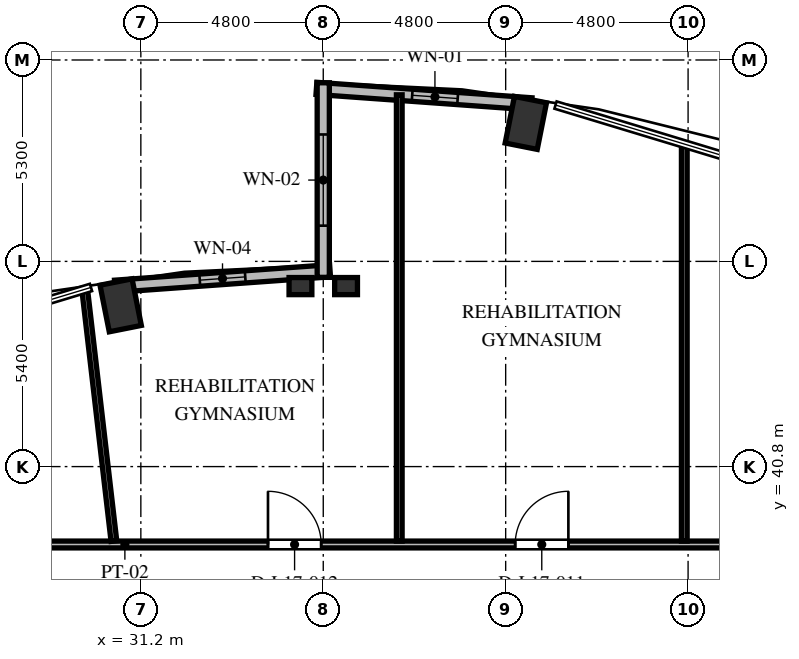
"""IFC4 building model, lengths in metres.
Left out: names, types, materials, properties, quantities, classifications, styles, units other than length and angle.
Written with IfcOpenShell. Run it as: python <this file> out.ifc"""

import sys

from ifc_helpers import new_model, si_unit, direction, frame, frame_2d, origin, origin_2d, place, context, subcontext, project, spatial, rectangle, extrude, element, fill, save


model = new_model("IFC4")
c1 = context("Model", 3, precision=1e-05, world=origin(), true_north=direction((0.0, 1.0)))
c2 = subcontext(c1, "Body", "Model", "MODEL_VIEW")
j1 = project(units=[si_unit("LENGTHUNIT", "METRE"), si_unit("PLANEANGLEUNIT", "RADIAN")], contexts=[c1])
p1 = place(None, origin())
s1 = spatial("IfcSite", under=j1, at=p1, CompositionType="ELEMENT")
p2 = place(p1, origin())
s2 = spatial("IfcBuilding", under=s1, at=p2, CompositionType="ELEMENT")
p3 = place(p2, frame((0.0, 0.0, 68.976)))
s3 = spatial("IfcBuildingStorey", under=s2, at=p3, CompositionType="ELEMENT", Elevation=68.976)
for number, where, z_axis, x_axis in (
    (1, (41.331, 49.844, 0.0), (0.0, 0.0, 1.0), (0.195, 0.981, 0.0)),
    (2, (30.669, 45.044, 0.0), (0.0, 0.0, 1.0), (-0.195, 0.981, 0.0)),
):
    element("IfcColumn", number, at=place(p3, frame(where, z_axis=z_axis, x_axis=x_axis)), inside=s3, PredefinedType="COLUMN", context=c2, shape_type="SweptSolid", body=[
        extrude(rectangle(XDim=1.25, YDim=0.86, at=origin_2d()), origin(), (0.0, 0.0, 1.0), 3.648),
    ])
for number, where, z_axis, x_axis in (
    (3, (35.4, 45.55, 0.0), (0.0, 0.0, 1.0), (1.0, 0.0, 0.0)),
    (4, (36.6, 45.55, 0.0), (0.0, 0.0, 1.0), (1.0, 0.0, 0.0)),
):
    element("IfcColumn", number, at=place(p3, frame(where, z_axis=z_axis, x_axis=x_axis)), inside=s3, PredefinedType="PILASTER", context=c2, shape_type="SweptSolid", body=[
        extrude(rectangle(XDim=0.6, YDim=0.45, at=origin_2d()), origin(), (0.0, 0.0, 1.0), 3.648),
    ])
p4 = place(p3, frame((41.481, 50.346, 0.0), z_axis=(0.0, 0.0, 1.0), x_axis=(-0.997422321809, 0.071754525696, 0.0)))
e5 = element("IfcWall", 5, at=p4, inside=s3, PredefinedType="SOLIDWALL", context=c2, shape_type="SweptSolid", body=[
    extrude(rectangle(XDim=5.675, YDim=0.32, at=frame_2d((2.838, 0.0))), origin(), (0.0, 0.0, 1.0), 3.428),
])
p5 = place(p4, frame((1.949, 0.0, 0.85)))
e6 = element("IfcOpeningElement", 6, at=p5, cuts=e5, PredefinedType="OPENING", context=c2, shape_type="SweptSolid", body=[
    extrude(rectangle(XDim=1.2, YDim=2.2, at=frame_2d((0.6, 1.1))), frame((0.0, 0.17, 0.0), z_axis=(0.0, -1.0, 0.0), x_axis=(1.0, 0.0, 0.0)), (0.0, 0.0, 1.0), 0.34),
])
p6 = place(p3, frame((36.179, 45.953, 0.0), z_axis=(0.0, 0.0, 1.0), x_axis=(-0.997421878774, -0.071760683825, 0.0)))
e7 = element("IfcWall", 7, at=p6, inside=s3, PredefinedType="SOLIDWALL", context=c2, shape_type="SweptSolid", body=[
    extrude(rectangle(XDim=5.675, YDim=0.32, at=frame_2d((2.837, 0.0))), origin(), (0.0, 0.0, 1.0), 3.428),
])
p7 = place(p6, frame((2.237, 0.0, 0.85)))
e8 = element("IfcOpeningElement", 8, at=p7, cuts=e7, PredefinedType="OPENING", context=c2, shape_type="SweptSolid", body=[
    extrude(rectangle(XDim=1.2, YDim=1.8, at=frame_2d((0.6, 0.9))), frame((0.0, 0.17, 0.0), z_axis=(0.0, -1.0, 0.0), x_axis=(1.0, 0.0, 0.0)), (0.0, 0.0, 1.0), 0.34),
])
p8 = place(p3, frame((36.0, 50.9, 0.0), z_axis=(0.0, 0.0, 1.0), x_axis=(0.0, -1.0, 0.0)))
e9 = element("IfcWall", 9, at=p8, inside=s3, PredefinedType="SOLIDWALL", context=c2, shape_type="SweptSolid", body=[
    extrude(rectangle(XDim=5.12, YDim=0.32, at=frame_2d((2.56, 0.0))), origin(), (0.0, 0.0, 1.0), 3.428),
])
p9 = place(p8, frame((1.36, 0.0, 0.84)))
e10 = element("IfcOpeningElement", 10, at=p9, cuts=e9, PredefinedType="OPENING", context=c2, shape_type="SweptSolid", body=[
    extrude(rectangle(XDim=2.4, YDim=2.04, at=frame_2d((1.2, 1.02))), frame((0.0, 0.17, 0.0), z_axis=(0.0, -1.0, 0.0), x_axis=(1.0, 0.0, 0.0)), (0.0, 0.0, 1.0), 0.34),
])
p10 = place(p3, frame((23.31, 38.75, 0.0), z_axis=(0.0, 0.0, 1.0), x_axis=(1.0, 0.0, 0.0)))
e11 = element("IfcWall", 11, at=p10, inside=s3, PredefinedType="PARTITIONING", context=c2, shape_type="SweptSolid", body=[
    extrude(rectangle(XDim=29.88, YDim=0.18, at=frame_2d((14.94, 0.0))), origin(), (0.0, 0.0, 1.0), 3.053),
])
p11 = place(p10, frame((25.176, 0.0, 0.0)))
e12 = element("IfcOpeningElement", 12, at=p11, cuts=e11, PredefinedType="OPENING", context=c2, shape_type="SweptSolid", body=[
    extrude(rectangle(XDim=1.4, YDim=2.2, at=frame_2d((0.7, 1.1))), frame((0.0, 0.1, 0.0), z_axis=(0.0, -1.0, 0.0), x_axis=(1.0, 0.0, 0.0)), (0.0, 0.0, 1.0), 0.2),
])
p12 = place(p10, frame((17.74, 0.0, 0.0)))
e13 = element("IfcOpeningElement", 13, at=p12, cuts=e11, PredefinedType="OPENING", context=c2, shape_type="SweptSolid", body=[
    extrude(rectangle(XDim=1.4, YDim=2.2, at=frame_2d((0.7, 1.1))), frame((0.0, 0.1, 0.0), z_axis=(0.0, -1.0, 0.0), x_axis=(1.0, 0.0, 0.0)), (0.0, 0.0, 1.0), 0.2),
])
p13 = place(p10, frame((11.236, 0.0, 0.0)))
e14 = element("IfcOpeningElement", 14, at=p13, cuts=e11, PredefinedType="OPENING", context=c2, shape_type="SweptSolid", body=[
    extrude(rectangle(XDim=1.4, YDim=2.2, at=frame_2d((0.7, 1.1))), frame((0.0, 0.1, 0.0), z_axis=(0.0, -1.0, 0.0), x_axis=(1.0, 0.0, 0.0)), (0.0, 0.0, 1.0), 0.2),
])
p14 = place(p3, frame((30.491, 38.84, 0.0), z_axis=(0.0, 0.0, 1.0), x_axis=(-0.115342161953, 0.993325820502, 0.0)))
e15 = element("IfcWall", 15, at=p14, inside=s3, PredefinedType="PARTITIONING", context=c2, shape_type="SweptSolid", body=[
    extrude(rectangle(XDim=6.672, YDim=0.15, at=frame_2d((3.336, 0.0))), origin(), (0.0, 0.0, 1.0), 3.428),
])
p15 = place(p3, frame((38.0, 38.84, 0.0), z_axis=(0.0, 0.0, 1.0), x_axis=(0.0, 1.0, 0.0)))
e16 = element("IfcWall", 16, at=p15, inside=s3, PredefinedType="PARTITIONING", context=c2, shape_type="SweptSolid", body=[
    extrude(rectangle(XDim=11.743, YDim=0.15, at=frame_2d((5.872, 0.0))), origin(), (0.0, 0.0, 1.0), 3.428),
])
p16 = place(p3, frame((45.5, 38.84, 0.0), z_axis=(0.0, 0.0, 1.0), x_axis=(0.0, 1.0, 0.0)))
e17 = element("IfcWall", 17, at=p16, inside=s3, PredefinedType="PARTITIONING", context=c2, shape_type="SweptSolid", body=[
    extrude(rectangle(XDim=10.436, YDim=0.15, at=frame_2d((5.218, 0.0))), origin(), (0.0, 0.0, 1.0), 3.428),
])
p17 = place(p5, origin())
e18 = element("IfcWindow", 18, at=p17, inside=s3, PartitioningType="SINGLE_PANEL", PredefinedType="WINDOW", context=c2, shape_type="SweptSolid", body=[
    extrude(rectangle(XDim=1.2, YDim=2.2, at=frame_2d((0.6, 1.1))), frame((0.0, 0.03, 0.0), z_axis=(0.0, -1.0, 0.0), x_axis=(1.0, 0.0, 0.0)), (0.0, 0.0, 1.0), 0.06),
])
fill(e6, e18)
p18 = place(p7, origin())
e19 = element("IfcWindow", 19, at=p18, inside=s3, PartitioningType="SINGLE_PANEL", PredefinedType="WINDOW", context=c2, shape_type="SweptSolid", body=[
    extrude(rectangle(XDim=1.2, YDim=1.8, at=frame_2d((0.6, 0.9))), frame((0.0, 0.03, 0.0), z_axis=(0.0, -1.0, 0.0), x_axis=(1.0, 0.0, 0.0)), (0.0, 0.0, 1.0), 0.06),
])
fill(e8, e19)
p19 = place(p9, origin())
e20 = element("IfcWindow", 20, at=p19, inside=s3, PartitioningType="SINGLE_PANEL", PredefinedType="WINDOW", context=c2, shape_type="SweptSolid", body=[
    extrude(rectangle(XDim=2.4, YDim=2.04, at=frame_2d((1.2, 1.02))), frame((0.0, 0.03, 0.0), z_axis=(0.0, -1.0, 0.0), x_axis=(1.0, 0.0, 0.0)), (0.0, 0.0, 1.0), 0.06),
])
fill(e10, e20)
p20 = place(p12, origin())
e21 = element("IfcDoor", 21, at=p20, inside=s3, OperationType="SINGLE_SWING_RIGHT", PredefinedType="DOOR", context=c2, shape_type="SweptSolid", body=[
    extrude(rectangle(XDim=1.4, YDim=2.2, at=frame_2d((0.7, 1.1))), frame((0.0, 0.025, 0.0), z_axis=(0.0, -1.0, 0.0), x_axis=(1.0, 0.0, 0.0)), (0.0, 0.0, 1.0), 0.05),
])
fill(e13, e21)
p21 = place(p13, origin())
e22 = element("IfcDoor", 22, at=p21, inside=s3, OperationType="SINGLE_SWING_LEFT", PredefinedType="DOOR", context=c2, shape_type="SweptSolid", body=[
    extrude(rectangle(XDim=1.4, YDim=2.2, at=frame_2d((0.7, 1.1))), frame((0.0, 0.025, 0.0), z_axis=(0.0, -1.0, 0.0), x_axis=(1.0, 0.0, 0.0)), (0.0, 0.0, 1.0), 0.05),
])
fill(e14, e22)
save(model, sys.argv[1])
